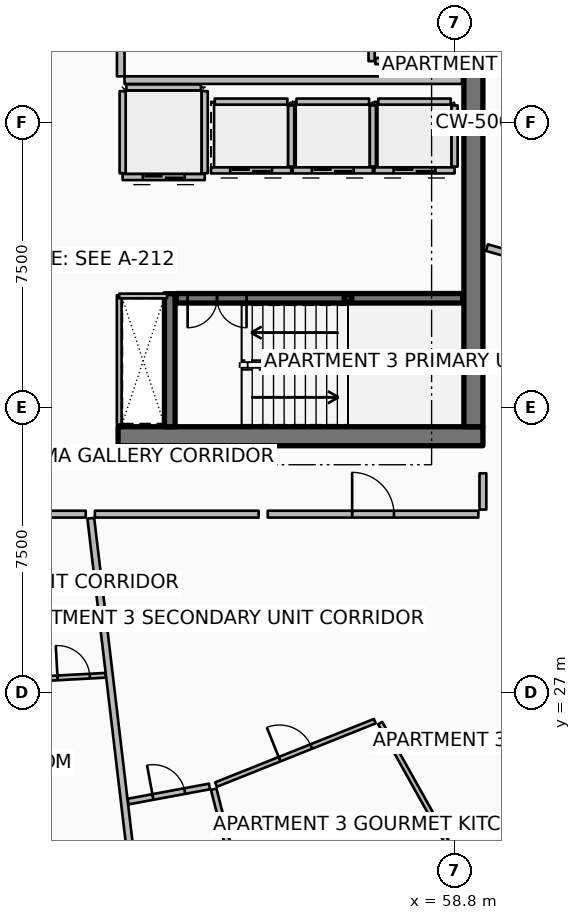
"""IFC4 building model, lengths in metres.
Left out: names, types, materials, properties, quantities, classifications, styles, units other than length and angle.
Written with IfcOpenShell. Run it as: python <this file> out.ifc"""

import sys

from ifc_helpers import new_model, si_unit, direction, frame, frame_2d, origin, origin_2d, place, context, subcontext, project, spatial, rectangle, hollow_rectangle, extrude, element, fill, save


model = new_model("IFC4")
c1 = context("Model", 3, precision=1e-05, world=origin(), true_north=direction((0.0, 1.0)))
c2 = subcontext(c1, "Body", "Model", "MODEL_VIEW")
j1 = project(units=[si_unit("LENGTHUNIT", "METRE"), si_unit("PLANEANGLEUNIT", "RADIAN")], contexts=[c1])
p1 = place(None, origin())
s1 = spatial("IfcSite", under=j1, at=p1, CompositionType="ELEMENT")
p2 = place(p1, origin())
s2 = spatial("IfcBuilding", under=s1, at=p2, CompositionType="ELEMENT")
p3 = place(p2, frame((0.0, 0.0, 275.2)))
s3 = spatial("IfcBuildingStorey", under=s2, at=p3, CompositionType="ELEMENT", Elevation=275.2)
p4 = place(p3, frame((49.95, 33.75, 0.0), z_axis=(0.0, 0.0, 1.0), x_axis=(1.0, 0.0, 0.0)))
e1 = element("IfcWall", 1, at=p4, inside=s3, PredefinedType="SHEAR", context=c2, shape_type="SweptSolid", body=[
    extrude(rectangle(XDim=9.6, YDim=0.5, at=frame_2d((4.8, 0.0))), origin(), (0.0, 0.0, 1.0), 3.85),
])
p5 = place(p3, frame((59.3, 34.0, 0.0), z_axis=(0.0, 0.0, 1.0), x_axis=(0.0, 1.0, 0.0)))
e2 = element("IfcWall", 2, at=p5, inside=s3, PredefinedType="SHEAR", context=c2, shape_type="SweptSolid", body=[
    extrude(rectangle(XDim=16.0, YDim=0.5, at=frame_2d((8.0, 0.0))), origin(), (0.0, 0.0, 1.0), 3.85),
])
p6 = place(p3, frame((51.31, 34.0, 0.0), z_axis=(0.0, 0.0, 1.0), x_axis=(0.0, 1.0, 0.0)))
e3 = element("IfcWall", 3, at=p6, inside=s3, PredefinedType="SHEAR", context=c2, shape_type="SweptSolid", body=[
    extrude(rectangle(XDim=3.5, YDim=0.28, at=frame_2d((1.75, 0.0))), origin(), (0.0, 0.0, 1.0), 3.85),
])
p7 = place(p3, frame((56.0, 37.38, 0.0), z_axis=(0.0, 0.0, 1.0), x_axis=(1.0, 0.0, 0.0)))
e4 = element("IfcColumn", 4, at=p7, inside=s3, PredefinedType="COLUMN", context=c2, shape_type="SweptSolid", body=[
    extrude(hollow_rectangle(XDim=0.2, YDim=0.2, WallThickness=0.01, InnerFilletRadius=0.01, OuterFilletRadius=0.02, at=origin_2d()), origin(), (0.0, 0.0, 1.0), 1.72),
])
p8 = place(p3, frame((51.48, 37.38, 0.0), z_axis=(0.0, 0.0, 1.0), x_axis=(1.0, 0.0, 0.0)))
e5 = element("IfcWall", 5, at=p8, inside=s3, PredefinedType="SOLIDWALL", context=c2, shape_type="SweptSolid", body=[
    extrude(rectangle(XDim=7.54, YDim=0.25, at=frame_2d((3.77, 0.0))), origin(), (0.0, 0.0, 1.0), 3.59),
])
p9 = place(p8, frame((0.3, 0.0, 0.0)))
e6 = element("IfcOpeningElement", 6, at=p9, cuts=e5, PredefinedType="OPENING", context=c2, shape_type="SweptSolid", body=[
    extrude(rectangle(XDim=1.55, YDim=2.15, at=frame_2d((0.775, 1.075))), frame((0.0, 0.135, 0.0), z_axis=(0.0, -1.0, 0.0), x_axis=(1.0, 0.0, 0.0)), (0.0, 0.0, 1.0), 0.27),
])
p10 = place(p3, frame((54.505, 40.745, 0.0), z_axis=(0.0, 0.0, 1.0), x_axis=(-1.0, 0.0, 0.0)))
e7 = element("IfcWall", 7, at=p10, inside=s3, PredefinedType="PARTITIONING", context=c2, shape_type="SweptSolid", body=[
    extrude(rectangle(XDim=2.11, YDim=0.16, at=frame_2d((1.055, 0.0))), origin(), (0.0, 0.0, 1.0), 3.59),
])
p11 = place(p10, frame((0.505, 0.0, 0.0)))
e8 = element("IfcOpeningElement", 8, at=p11, cuts=e7, PredefinedType="OPENING", context=c2, shape_type="SweptSolid", body=[
    extrude(rectangle(XDim=1.1, YDim=2.1, at=frame_2d((0.55, 1.05))), frame((0.0, 0.09, 0.0), z_axis=(0.0, -1.0, 0.0), x_axis=(1.0, 0.0, 0.0)), (0.0, 0.0, 1.0), 0.18),
])
p12 = place(p3, frame((54.505, 40.845, 0.0), z_axis=(0.0, 0.0, 1.0), x_axis=(0.0, 1.0, 0.0)))
e9 = element("IfcWall", 9, at=p12, inside=s3, PredefinedType="PARTITIONING", context=c2, shape_type="SweptSolid", body=[
    extrude(rectangle(XDim=1.61, YDim=0.16, at=frame_2d((0.805, 0.0))), origin(), (0.0, 0.0, 1.0), 3.59),
])
p13 = place(p3, frame((52.495, 42.555, 0.0), z_axis=(0.0, 0.0, 1.0), x_axis=(1.0, 0.0, 0.0)))
e10 = element("IfcWall", 10, at=p13, inside=s3, PredefinedType="PARTITIONING", context=c2, shape_type="SweptSolid", body=[
    extrude(rectangle(XDim=1.91, YDim=0.16, at=frame_2d((0.955, 0.0))), origin(), (0.0, 0.0, 1.0), 3.59),
])
p14 = place(p3, frame((56.655, 40.745, 0.0), z_axis=(0.0, 0.0, 1.0), x_axis=(-1.0, 0.0, 0.0)))
e11 = element("IfcWall", 11, at=p14, inside=s3, PredefinedType="PARTITIONING", context=c2, shape_type="SweptSolid", body=[
    extrude(rectangle(XDim=2.11, YDim=0.16, at=frame_2d((1.055, 0.0))), origin(), (0.0, 0.0, 1.0), 3.59),
])
p15 = place(p14, frame((0.505, 0.0, 0.0)))
e12 = element("IfcOpeningElement", 12, at=p15, cuts=e11, PredefinedType="OPENING", context=c2, shape_type="SweptSolid", body=[
    extrude(rectangle(XDim=1.1, YDim=2.1, at=frame_2d((0.55, 1.05))), frame((0.0, 0.09, 0.0), z_axis=(0.0, -1.0, 0.0), x_axis=(1.0, 0.0, 0.0)), (0.0, 0.0, 1.0), 0.18),
])
p16 = place(p3, frame((56.655, 40.845, 0.0), z_axis=(0.0, 0.0, 1.0), x_axis=(0.0, 1.0, 0.0)))
e13 = element("IfcWall", 13, at=p16, inside=s3, PredefinedType="PARTITIONING", context=c2, shape_type="SweptSolid", body=[
    extrude(rectangle(XDim=1.61, YDim=0.16, at=frame_2d((0.805, 0.0))), origin(), (0.0, 0.0, 1.0), 3.59),
])
p17 = place(p3, frame((54.645, 42.555, 0.0), z_axis=(0.0, 0.0, 1.0), x_axis=(1.0, 0.0, 0.0)))
e14 = element("IfcWall", 14, at=p17, inside=s3, PredefinedType="PARTITIONING", context=c2, shape_type="SweptSolid", body=[
    extrude(rectangle(XDim=1.91, YDim=0.16, at=frame_2d((0.955, 0.0))), origin(), (0.0, 0.0, 1.0), 3.59),
])
p18 = place(p3, frame((58.805, 40.745, 0.0), z_axis=(0.0, 0.0, 1.0), x_axis=(-1.0, 0.0, 0.0)))
e15 = element("IfcWall", 15, at=p18, inside=s3, PredefinedType="PARTITIONING", context=c2, shape_type="SweptSolid", body=[
    extrude(rectangle(XDim=2.11, YDim=0.16, at=frame_2d((1.055, 0.0))), origin(), (0.0, 0.0, 1.0), 3.59),
])
p19 = place(p18, frame((0.505, 0.0, 0.0)))
e16 = element("IfcOpeningElement", 16, at=p19, cuts=e15, PredefinedType="OPENING", context=c2, shape_type="SweptSolid", body=[
    extrude(rectangle(XDim=1.1, YDim=2.1, at=frame_2d((0.55, 1.05))), frame((0.0, 0.09, 0.0), z_axis=(0.0, -1.0, 0.0), x_axis=(1.0, 0.0, 0.0)), (0.0, 0.0, 1.0), 0.18),
])
p20 = place(p3, frame((58.805, 40.845, 0.0), z_axis=(0.0, 0.0, 1.0), x_axis=(0.0, 1.0, 0.0)))
e17 = element("IfcWall", 17, at=p20, inside=s3, PredefinedType="PARTITIONING", context=c2, shape_type="SweptSolid", body=[
    extrude(rectangle(XDim=1.61, YDim=0.16, at=frame_2d((0.805, 0.0))), origin(), (0.0, 0.0, 1.0), 3.59),
])
p21 = place(p3, frame((56.795, 42.555, 0.0), z_axis=(0.0, 0.0, 1.0), x_axis=(1.0, 0.0, 0.0)))
e18 = element("IfcWall", 18, at=p21, inside=s3, PredefinedType="PARTITIONING", context=c2, shape_type="SweptSolid", body=[
    extrude(rectangle(XDim=1.91, YDim=0.16, at=frame_2d((0.955, 0.0))), origin(), (0.0, 0.0, 1.0), 3.59),
])
p22 = place(p3, frame((56.62, 46.08, 0.0), z_axis=(0.0, 0.0, 1.0), x_axis=(0.0, -1.0, 0.0)))
e19 = element("IfcWall", 19, at=p22, inside=s3, PredefinedType="PARTITIONING", context=c2, shape_type="SweptSolid", body=[
    extrude(rectangle(XDim=2.46, YDim=0.16, at=frame_2d((1.23, 0.0))), origin(), (0.0, 0.0, 1.0), 3.59),
])
p23 = place(p22, frame((0.68, 0.0, 0.0)))
e20 = element("IfcOpeningElement", 20, at=p23, cuts=e19, PredefinedType="OPENING", context=c2, shape_type="SweptSolid", body=[
    extrude(rectangle(XDim=1.1, YDim=2.1, at=frame_2d((0.55, 1.05))), frame((0.0, 0.09, 0.0), z_axis=(0.0, -1.0, 0.0), x_axis=(1.0, 0.0, 0.0)), (0.0, 0.0, 1.0), 0.18),
])
p24 = place(p3, frame((56.72, 43.62, 0.0), z_axis=(0.0, 0.0, 1.0), x_axis=(1.0, 0.0, 0.0)))
e21 = element("IfcWall", 21, at=p24, inside=s3, PredefinedType="PARTITIONING", context=c2, shape_type="SweptSolid", body=[
    extrude(rectangle(XDim=2.06, YDim=0.16, at=frame_2d((1.03, 0.0))), origin(), (0.0, 0.0, 1.0), 3.59),
])
p25 = place(p3, frame((52.23, 40.57, 0.0), z_axis=(0.0, 0.0, 1.0), x_axis=(-1.0, 0.0, 0.0)))
e22 = element("IfcWall", 22, at=p25, inside=s3, PredefinedType="PARTITIONING", context=c2, shape_type="SweptSolid", body=[
    extrude(rectangle(XDim=2.16, YDim=0.16, at=frame_2d((1.08, 0.0))), origin(), (0.0, 0.0, 1.0), 3.59),
])
p26 = place(p25, frame((0.53, 0.0, 0.0)))
e23 = element("IfcOpeningElement", 23, at=p26, cuts=e22, PredefinedType="OPENING", context=c2, shape_type="SweptSolid", body=[
    extrude(rectangle(XDim=1.1, YDim=2.1, at=frame_2d((0.55, 1.05))), frame((0.0, 0.09, 0.0), z_axis=(0.0, -1.0, 0.0), x_axis=(1.0, 0.0, 0.0)), (0.0, 0.0, 1.0), 0.18),
])
for number, where, z_axis, x_axis in (
    (24, (52.23, 40.67, 0.0), (0.0, 0.0, 1.0), (0.0, 1.0, 0.0)),
    (25, (50.07, 40.67, 0.0), (0.0, 0.0, 1.0), (0.0, 1.0, 0.0)),
):
    element("IfcWall", number, at=place(p3, frame(where, z_axis=z_axis, x_axis=x_axis)), inside=s3, PredefinedType="PARTITIONING", context=c2, shape_type="SweptSolid", body=[
        extrude(rectangle(XDim=2.16, YDim=0.16, at=frame_2d((1.08, 0.0))), origin(), (0.0, 0.0, 1.0), 3.59),
    ])
p27 = place(p3, frame((50.17, 42.93, 0.0), z_axis=(0.0, 0.0, 1.0), x_axis=(1.0, 0.0, 0.0)))
e26 = element("IfcWall", 26, at=p27, inside=s3, PredefinedType="PARTITIONING", context=c2, shape_type="SweptSolid", body=[
    extrude(rectangle(XDim=1.96, YDim=0.16, at=frame_2d((0.98, 0.0))), origin(), (0.0, 0.0, 1.0), 3.59),
])
p28 = place(p3, frame((50.12, 43.12, 0.0), z_axis=(0.0, 0.0, 1.0), x_axis=(1.0, 0.0, 0.0)))
e27 = element("IfcWall", 27, at=p28, inside=s3, PredefinedType="PARTITIONING", context=c2, shape_type="SweptSolid", body=[
    extrude(rectangle(XDim=8.88, YDim=0.2, at=frame_2d((4.44, 0.0))), origin(), (0.0, 0.0, 1.0), 3.59),
])
p29 = place(p3, frame((50.02, 43.22, 0.0), z_axis=(0.0, 0.0, 1.0), x_axis=(0.0, 1.0, 0.0)))
e28 = element("IfcWall", 28, at=p29, inside=s3, PredefinedType="PARTITIONING", context=c2, shape_type="SweptSolid", body=[
    extrude(rectangle(XDim=3.3, YDim=0.2, at=frame_2d((1.65, 0.0))), origin(), (0.0, 0.0, 1.0), 3.59),
])
p30 = place(p29, frame((1.125, 0.0, 0.0)))
e29 = element("IfcOpeningElement", 29, at=p30, cuts=e28, PredefinedType="OPENING", context=c2, shape_type="SweptSolid", body=[
    extrude(rectangle(XDim=1.05, YDim=2.1, at=frame_2d((0.525, 1.05))), frame((0.0, 0.11, 0.0), z_axis=(0.0, -1.0, 0.0), x_axis=(1.0, 0.0, 0.0)), (0.0, 0.0, 1.0), 0.22),
])
p31 = place(p3, frame((49.98, 34.06, 0.0), z_axis=(0.0, 0.0, 1.0), x_axis=(0.0, 1.0, 0.0)))
e30 = element("IfcWall", 30, at=p31, inside=s3, PredefinedType="PARTITIONING", context=c2, shape_type="SweptSolid", body=[
    extrude(rectangle(XDim=3.4, YDim=0.125, at=frame_2d((1.7, 0.0))), origin(), (0.0, 0.0, 1.0), 3.03),
])
p32 = place(p3, frame((49.98, 37.44, 0.0), z_axis=(0.0, 0.0, 1.0), x_axis=(1.0, 0.0, 0.0)))
e31 = element("IfcWall", 31, at=p32, inside=s3, PredefinedType="PARTITIONING", context=c2, shape_type="SweptSolid", body=[
    extrude(rectangle(XDim=1.26, YDim=0.125, at=frame_2d((0.63, 0.0))), origin(), (0.0, 0.0, 1.0), 3.03),
])
p33 = place(p3, frame((49.232, 31.591, 0.0), z_axis=(0.0, 0.0, 1.0), x_axis=(0.117545848714, -0.993067456646, 0.0)))
e32 = element("IfcWall", 32, at=p33, inside=s3, PredefinedType="PARTITIONING", context=c2, shape_type="SweptSolid", body=[
    extrude(rectangle(XDim=14.213, YDim=0.18, at=frame_2d((7.106, 0.0))), origin(), (0.0, 0.0, 1.0), 2.957),
])
p34 = place(p3, frame((59.656, 38.713, 0.0), z_axis=(0.0, 0.0, 1.0), x_axis=(0.962454756022, -0.27144215334, 0.0)))
e33 = element("IfcWall", 33, at=p34, inside=s3, PredefinedType="PARTITIONING", context=c2, shape_type="SweptSolid", body=[
    extrude(rectangle(XDim=17.385, YDim=0.18, at=frame_2d((8.692, 0.0))), origin(), (0.0, 0.0, 1.0), 2.957),
])
p35 = place(p3, frame((45.215, 31.7, 0.0), z_axis=(0.0, 0.0, 1.0), x_axis=(1.0, 0.0, 0.0)))
e34 = element("IfcWall", 34, at=p35, inside=s3, PredefinedType="PARTITIONING", context=c2, shape_type="SweptSolid", body=[
    extrude(rectangle(XDim=3.884, YDim=0.18, at=frame_2d((1.942, 0.0))), origin(), (0.0, 0.0, 1.0), 2.957),
])
p36 = place(p3, frame((47.942, 27.369, 0.0), z_axis=(0.0, 0.0, 1.0), x_axis=(0.998523596101, 0.054319683628, 0.0)))
e35 = element("IfcWall", 35, at=p36, inside=s3, PredefinedType="PARTITIONING", context=c2, shape_type="SweptSolid", body=[
    extrude(rectangle(XDim=1.681, YDim=0.125, at=frame_2d((0.84, 0.0))), origin(), (0.0, 0.0, 1.0), 3.03),
])
p37 = place(p36, frame((0.415, 0.0, 0.0)))
e36 = element("IfcOpeningElement", 36, at=p37, cuts=e35, PredefinedType="OPENING", context=c2, shape_type="SweptSolid", body=[
    extrude(rectangle(XDim=0.85, YDim=2.06, at=frame_2d((0.425, 1.03))), frame((0.0, 0.073, 0.0), z_axis=(0.0, -1.0, 0.0), x_axis=(1.0, 0.0, 0.0)), (0.0, 0.0, 1.0), 0.145),
])
p38 = place(p3, frame((53.888, 31.7, 0.0), z_axis=(0.0, 0.0, 1.0), x_axis=(1.0, 0.0, 0.0)))
e37 = element("IfcWall", 37, at=p38, inside=s3, PredefinedType="PARTITIONING", context=c2, shape_type="SweptSolid", body=[
    extrude(rectangle(XDim=5.542, YDim=0.18, at=frame_2d((2.771, 0.0))), origin(), (0.0, 0.0, 1.0), 2.957),
])
p39 = place(p38, frame((2.221, 0.0, 0.0)))
e38 = element("IfcOpeningElement", 38, at=p39, cuts=e37, PredefinedType="OPENING", context=c2, shape_type="SweptSolid", body=[
    extrude(rectangle(XDim=1.1, YDim=2.1, at=frame_2d((0.55, 1.05))), frame((0.0, 0.1, 0.0), z_axis=(0.0, -1.0, 0.0), x_axis=(1.0, 0.0, 0.0)), (0.0, 0.0, 1.0), 0.2),
])
p40 = place(p3, frame((59.55, 31.82, 0.0), z_axis=(0.0, 0.0, 1.0), x_axis=(0.0, 1.0, 0.0)))
e39 = element("IfcWall", 39, at=p40, inside=s3, PredefinedType="PARTITIONING", context=c2, shape_type="SweptSolid", body=[
    extrude(rectangle(XDim=0.955, YDim=0.18, at=frame_2d((0.477, 0.0))), origin(), (0.0, 0.0, 1.0), 2.957),
])
p41 = place(p3, frame((49.339, 31.7, 0.0), z_axis=(0.0, 0.0, 1.0), x_axis=(1.0, 0.0, 0.0)))
e40 = element("IfcWall", 40, at=p41, inside=s3, PredefinedType="PARTITIONING", context=c2, shape_type="SweptSolid", body=[
    extrude(rectangle(XDim=4.309, YDim=0.18, at=frame_2d((2.155, 0.0))), origin(), (0.0, 0.0, 1.0), 2.957),
])
p42 = place(p3, frame((56.847, 26.203, 0.0), z_axis=(0.0, 0.0, 1.0), x_axis=(0.488636594114, -0.872487409017, 0.0)))
e41 = element("IfcWall", 41, at=p42, inside=s3, PredefinedType="PARTITIONING", context=c2, shape_type="SweptSolid", body=[
    extrude(rectangle(XDim=6.489, YDim=0.125, at=frame_2d((3.244, 0.0))), origin(), (0.0, 0.0, 1.0), 2.957),
])
p43 = place(p3, frame((50.215, 24.137, 0.0), z_axis=(0.0, 0.0, 1.0), x_axis=(0.983215758485, 0.182446628542, 0.0)))
e42 = element("IfcWall", 42, at=p43, inside=s3, PredefinedType="PARTITIONING", context=c2, shape_type="SweptSolid", body=[
    extrude(rectangle(XDim=2.177, YDim=0.15, at=frame_2d((1.089, 0.0))), origin(), (0.0, 0.0, 1.0), 2.957),
])
p44 = place(p43, frame((0.664, 0.0, 0.0)))
e43 = element("IfcOpeningElement", 43, at=p44, cuts=e42, PredefinedType="OPENING", context=c2, shape_type="SweptSolid", body=[
    extrude(rectangle(XDim=0.85, YDim=2.06, at=frame_2d((0.425, 1.03))), frame((0.0, 0.085, 0.0), z_axis=(0.0, -1.0, 0.0), x_axis=(1.0, 0.0, 0.0)), (0.0, 0.0, 1.0), 0.17),
])
p45 = place(p3, frame((52.466, 24.464, 0.0), z_axis=(0.0, 0.0, 1.0), x_axis=(0.246795883472, -0.969067485731, 0.0)))
e44 = element("IfcWall", 44, at=p45, inside=s3, PredefinedType="PARTITIONING", context=c2, shape_type="SweptSolid", body=[
    extrude(rectangle(XDim=4.326, YDim=0.15, at=frame_2d((2.163, 0.0))), origin(), (0.0, 0.0, 1.0), 3.03),
])
p46 = place(p3, frame((52.527, 24.584, 0.0), z_axis=(0.0, 0.0, 1.0), x_axis=(0.928678664633, 0.370885343274, 0.0)))
e45 = element("IfcWall", 45, at=p46, inside=s3, PredefinedType="PARTITIONING", context=c2, shape_type="SweptSolid", body=[
    extrude(rectangle(XDim=4.499, YDim=0.125, at=frame_2d((2.249, 0.0))), origin(), (0.0, 0.0, 1.0), 2.957),
])
p47 = place(p46, frame((1.799, 0.0, 0.0)))
e46 = element("IfcOpeningElement", 46, at=p47, cuts=e45, PredefinedType="OPENING", context=c2, shape_type="SweptSolid", body=[
    extrude(rectangle(XDim=0.9, YDim=2.08, at=frame_2d((0.45, 1.04))), frame((0.0, 0.073, 0.0), z_axis=(0.0, -1.0, 0.0), x_axis=(1.0, 0.0, 0.0)), (0.0, 0.0, 1.0), 0.145),
])
p48 = place(p9, origin())
e47 = element("IfcDoor", 47, at=p48, inside=s3, OperationType="DOUBLE_DOOR_SINGLE_SWING", PredefinedType="DOOR", context=c2, shape_type="SweptSolid", body=[
    extrude(rectangle(XDim=1.55, YDim=2.15, at=frame_2d((0.775, 1.075))), frame((0.0, 0.025, 0.0), z_axis=(0.0, -1.0, 0.0), x_axis=(1.0, 0.0, 0.0)), (0.0, 0.0, 1.0), 0.05),
])
fill(e6, e47)
p49 = place(p11, origin())
e48 = element("IfcDoor", 48, at=p49, inside=s3, OperationType="DOUBLE_DOOR_SLIDING", PredefinedType="DOOR", context=c2, shape_type="SweptSolid", body=[
    extrude(rectangle(XDim=1.1, YDim=2.1, at=frame_2d((0.55, 1.05))), frame((0.0, 0.025, 0.0), z_axis=(0.0, -1.0, 0.0), x_axis=(1.0, 0.0, 0.0)), (0.0, 0.0, 1.0), 0.05),
])
fill(e8, e48)
p50 = place(p15, origin())
e49 = element("IfcDoor", 49, at=p50, inside=s3, OperationType="DOUBLE_DOOR_SLIDING", PredefinedType="DOOR", context=c2, shape_type="SweptSolid", body=[
    extrude(rectangle(XDim=1.1, YDim=2.1, at=frame_2d((0.55, 1.05))), frame((0.0, 0.025, 0.0), z_axis=(0.0, -1.0, 0.0), x_axis=(1.0, 0.0, 0.0)), (0.0, 0.0, 1.0), 0.05),
])
fill(e12, e49)
p51 = place(p19, origin())
e50 = element("IfcDoor", 50, at=p51, inside=s3, OperationType="DOUBLE_DOOR_SLIDING", PredefinedType="DOOR", context=c2, shape_type="SweptSolid", body=[
    extrude(rectangle(XDim=1.1, YDim=2.1, at=frame_2d((0.55, 1.05))), frame((0.0, 0.025, 0.0), z_axis=(0.0, -1.0, 0.0), x_axis=(1.0, 0.0, 0.0)), (0.0, 0.0, 1.0), 0.05),
])
fill(e16, e50)
p52 = place(p26, origin())
e51 = element("IfcDoor", 51, at=p52, inside=s3, OperationType="DOUBLE_DOOR_SLIDING", PredefinedType="DOOR", context=c2, shape_type="SweptSolid", body=[
    extrude(rectangle(XDim=1.1, YDim=2.1, at=frame_2d((0.55, 1.05))), frame((0.0, 0.025, 0.0), z_axis=(0.0, -1.0, 0.0), x_axis=(1.0, 0.0, 0.0)), (0.0, 0.0, 1.0), 0.05),
])
fill(e23, e51)
p53 = place(p37, origin())
e52 = element("IfcDoor", 52, at=p53, inside=s3, OperationType="SINGLE_SWING_LEFT", PredefinedType="DOOR", context=c2, shape_type="SweptSolid", body=[
    extrude(rectangle(XDim=0.85, YDim=2.06, at=frame_2d((0.425, 1.03))), frame((0.0, 0.025, 0.0), z_axis=(0.0, -1.0, 0.0), x_axis=(1.0, 0.0, 0.0)), (0.0, 0.0, 1.0), 0.05),
])
fill(e36, e52)
p54 = place(p39, origin())
e53 = element("IfcDoor", 53, at=p54, inside=s3, OperationType="SINGLE_SWING_LEFT", PredefinedType="DOOR", context=c2, shape_type="SweptSolid", body=[
    extrude(rectangle(XDim=1.1, YDim=2.1, at=frame_2d((0.55, 1.05))), frame((0.0, 0.025, 0.0), z_axis=(0.0, -1.0, 0.0), x_axis=(1.0, 0.0, 0.0)), (0.0, 0.0, 1.0), 0.05),
])
fill(e38, e53)
p55 = place(p44, origin())
e54 = element("IfcDoor", 54, at=p55, inside=s3, OperationType="SINGLE_SWING_LEFT", PredefinedType="DOOR", context=c2, shape_type="SweptSolid", body=[
    extrude(rectangle(XDim=0.85, YDim=2.06, at=frame_2d((0.425, 1.03))), frame((0.0, 0.025, 0.0), z_axis=(0.0, -1.0, 0.0), x_axis=(1.0, 0.0, 0.0)), (0.0, 0.0, 1.0), 0.05),
])
fill(e43, e54)
p56 = place(p47, origin())
e55 = element("IfcDoor", 55, at=p56, inside=s3, OperationType="SINGLE_SWING_LEFT", PredefinedType="DOOR", context=c2, shape_type="SweptSolid", body=[
    extrude(rectangle(XDim=0.9, YDim=2.08, at=frame_2d((0.45, 1.04))), frame((0.0, 0.025, 0.0), z_axis=(0.0, -1.0, 0.0), x_axis=(1.0, 0.0, 0.0)), (0.0, 0.0, 1.0), 0.05),
])
fill(e46, e55)
save(model, sys.argv[1])
